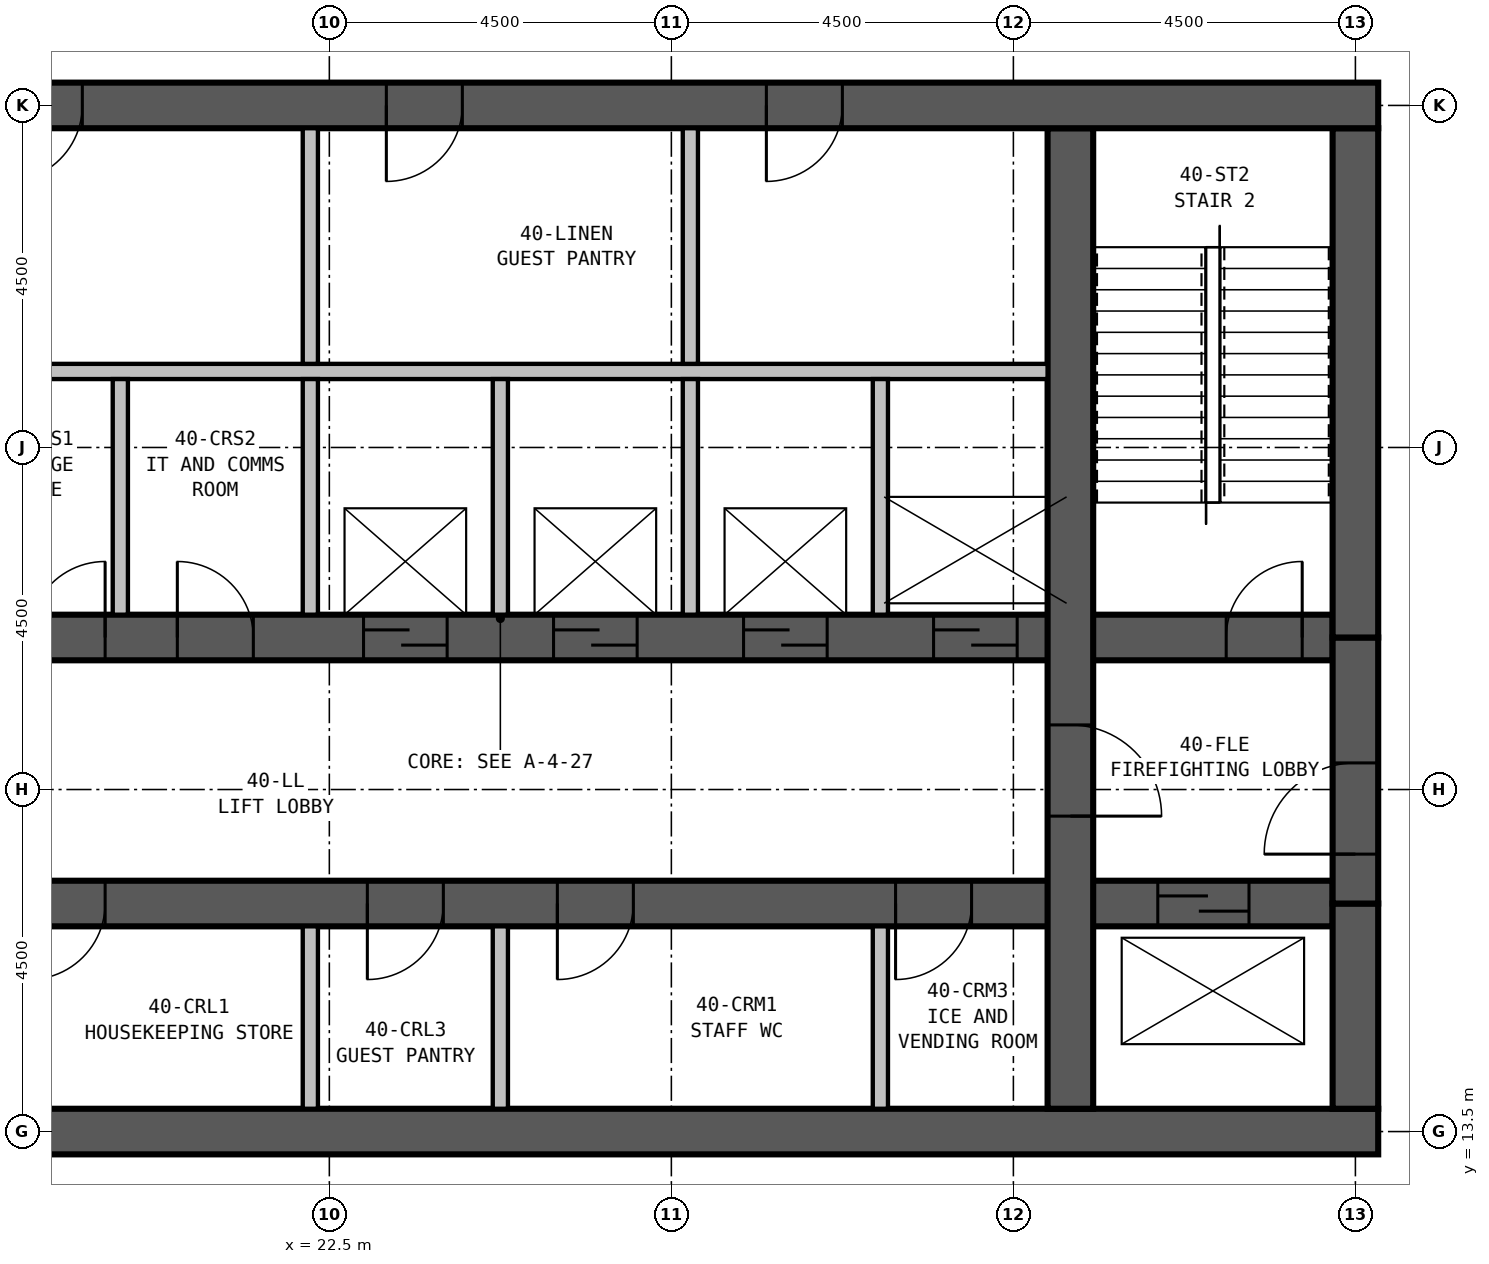
"""IFC4 building model, lengths in metres.
Left out: names, types, materials, properties, quantities, classifications, styles, units other than length and angle.
Written with IfcOpenShell. Run it as: python <this file> out.ifc"""

import sys

from ifc_helpers import new_model, si_unit, direction, frame, frame_2d, origin, place, context, subcontext, project, spatial, rectangle, extrude, element, fill, save


model = new_model("IFC4")
c1 = context("Model", 3, precision=1e-05, world=origin(), true_north=direction((0.0, 1.0)))
c2 = subcontext(c1, "Body", "Model", "MODEL_VIEW")
j1 = project(units=[si_unit("LENGTHUNIT", "METRE"), si_unit("PLANEANGLEUNIT", "RADIAN")], contexts=[c1])
p1 = place(None, origin())
s1 = spatial("IfcSite", under=j1, at=p1, CompositionType="ELEMENT")
p2 = place(p1, origin())
s2 = spatial("IfcBuilding", under=s1, at=p2, CompositionType="ELEMENT")
p3 = place(p2, frame((0.0, 0.0, 157.9)))
s3 = spatial("IfcBuildingStorey", under=s2, at=p3, CompositionType="ELEMENT", Elevation=157.9)
p4 = place(p3, frame((13.2, 13.5, 0.0), z_axis=(0.0, 0.0, 1.0), x_axis=(1.0, 0.0, 0.0)))
e1 = element("IfcWall", 1, at=p4, inside=s3, PredefinedType="SHEAR", context=c2, shape_type="SweptSolid", body=[
    extrude(rectangle(XDim=23.1, YDim=0.6, at=frame_2d((11.55, 0.0))), origin(), (0.0, 0.0, 1.0), 4.5),
])
p5 = place(p3, frame((36.3, 27.0, 0.0), z_axis=(0.0, 0.0, 1.0), x_axis=(-1.0, 0.0, 0.0)))
e2 = element("IfcWall", 2, at=p5, inside=s3, PredefinedType="SHEAR", context=c2, shape_type="SweptSolid", body=[
    extrude(rectangle(XDim=23.1, YDim=0.6, at=frame_2d((11.55, 0.0))), origin(), (0.0, 0.0, 1.0), 4.5),
])
p6 = place(p5, frame((17.05, 0.0, 0.0)))
e3 = element("IfcOpeningElement", 3, at=p6, cuts=e2, PredefinedType="OPENING", context=c2, shape_type="SweptSolid", body=[
    extrude(rectangle(XDim=1.0, YDim=2.1, at=frame_2d((0.5, 1.05))), frame((0.0, 0.31, 0.0), z_axis=(0.0, -1.0, 0.0), x_axis=(1.0, 0.0, 0.0)), (0.0, 0.0, 1.0), 0.62),
])
p7 = place(p5, frame((12.05, 0.0, 0.0)))
e4 = element("IfcOpeningElement", 4, at=p7, cuts=e2, PredefinedType="OPENING", context=c2, shape_type="SweptSolid", body=[
    extrude(rectangle(XDim=1.0, YDim=2.1, at=frame_2d((0.5, 1.05))), frame((0.0, 0.31, 0.0), z_axis=(0.0, -1.0, 0.0), x_axis=(1.0, 0.0, 0.0)), (0.0, 0.0, 1.0), 0.62),
])
p8 = place(p5, frame((7.05, 0.0, 0.0)))
e5 = element("IfcOpeningElement", 5, at=p8, cuts=e2, PredefinedType="OPENING", context=c2, shape_type="SweptSolid", body=[
    extrude(rectangle(XDim=1.0, YDim=2.1, at=frame_2d((0.5, 1.05))), frame((0.0, 0.31, 0.0), z_axis=(0.0, -1.0, 0.0), x_axis=(1.0, 0.0, 0.0)), (0.0, 0.0, 1.0), 0.62),
])
p9 = place(p3, frame((32.25, 13.8, 0.0), z_axis=(0.0, 0.0, 1.0), x_axis=(0.0, 1.0, 0.0)))
e6 = element("IfcWall", 6, at=p9, inside=s3, PredefinedType="SHEAR", context=c2, shape_type="SweptSolid", body=[
    extrude(rectangle(XDim=12.9, YDim=0.6, at=frame_2d((6.45, 0.0))), origin(), (0.0, 0.0, 1.0), 4.5),
])
p10 = place(p9, frame((5.05, 0.0, 0.0), z_axis=(0.0, 0.0, 1.0), x_axis=(-1.0, 0.0, 0.0)))
e7 = element("IfcOpeningElement", 7, at=p10, cuts=e6, PredefinedType="OPENING", context=c2, shape_type="SweptSolid", body=[
    extrude(rectangle(XDim=1.2, YDim=2.1, at=frame_2d((0.6, 1.05))), frame((0.0, 0.31, 0.0), z_axis=(0.0, -1.0, 0.0), x_axis=(1.0, 0.0, 0.0)), (0.0, 0.0, 1.0), 0.62),
])
p11 = place(p3, frame((13.8, 16.5, 0.0), z_axis=(0.0, 0.0, 1.0), x_axis=(1.0, 0.0, 0.0)))
e8 = element("IfcWall", 8, at=p11, inside=s3, PredefinedType="SHEAR", context=c2, shape_type="SweptSolid", body=[
    extrude(rectangle(XDim=21.9, YDim=0.6, at=frame_2d((10.95, 0.0))), origin(), (0.0, 0.0, 1.0), 4.5),
])
p12 = place(p11, frame((5.75, 0.0, 0.0), z_axis=(0.0, 0.0, 1.0), x_axis=(-1.0, 0.0, 0.0)))
e9 = element("IfcOpeningElement", 9, at=p12, cuts=e8, PredefinedType="OPENING", context=c2, shape_type="SweptSolid", body=[
    extrude(rectangle(XDim=1.0, YDim=2.1, at=frame_2d((0.5, 1.05))), frame((0.0, 0.31, 0.0), z_axis=(0.0, -1.0, 0.0), x_axis=(1.0, 0.0, 0.0)), (0.0, 0.0, 1.0), 0.62),
])
p13 = place(p11, frame((10.2, 0.0, 0.0), z_axis=(0.0, 0.0, 1.0), x_axis=(-1.0, 0.0, 0.0)))
e10 = element("IfcOpeningElement", 10, at=p13, cuts=e8, PredefinedType="OPENING", context=c2, shape_type="SweptSolid", body=[
    extrude(rectangle(XDim=1.0, YDim=2.1, at=frame_2d((0.5, 1.05))), frame((0.0, 0.31, 0.0), z_axis=(0.0, -1.0, 0.0), x_axis=(1.0, 0.0, 0.0)), (0.0, 0.0, 1.0), 0.62),
])
p14 = place(p11, frame((12.7, 0.0, 0.0), z_axis=(0.0, 0.0, 1.0), x_axis=(-1.0, 0.0, 0.0)))
e11 = element("IfcOpeningElement", 11, at=p14, cuts=e8, PredefinedType="OPENING", context=c2, shape_type="SweptSolid", body=[
    extrude(rectangle(XDim=1.0, YDim=2.1, at=frame_2d((0.5, 1.05))), frame((0.0, 0.31, 0.0), z_axis=(0.0, -1.0, 0.0), x_axis=(1.0, 0.0, 0.0)), (0.0, 0.0, 1.0), 0.62),
])
p15 = place(p11, frame((17.15, 0.0, 0.0), z_axis=(0.0, 0.0, 1.0), x_axis=(-1.0, 0.0, 0.0)))
e12 = element("IfcOpeningElement", 12, at=p15, cuts=e8, PredefinedType="OPENING", context=c2, shape_type="SweptSolid", body=[
    extrude(rectangle(XDim=1.0, YDim=2.1, at=frame_2d((0.5, 1.05))), frame((0.0, 0.31, 0.0), z_axis=(0.0, -1.0, 0.0), x_axis=(1.0, 0.0, 0.0)), (0.0, 0.0, 1.0), 0.62),
])
p16 = place(p11, frame((0.6, 0.0, 0.0)))
e13 = element("IfcOpeningElement", 13, at=p16, cuts=e8, PredefinedType="OPENING", context=c2, shape_type="SweptSolid", body=[
    extrude(rectangle(XDim=1.2, YDim=2.1, at=frame_2d((0.6, 1.05))), frame((0.0, 0.31, 0.0), z_axis=(0.0, -1.0, 0.0), x_axis=(1.0, 0.0, 0.0)), (0.0, 0.0, 1.0), 0.62),
])
p17 = place(p11, frame((19.6, 0.0, 0.0)))
e14 = element("IfcOpeningElement", 14, at=p17, cuts=e8, PredefinedType="OPENING", context=c2, shape_type="SweptSolid", body=[
    extrude(rectangle(XDim=1.2, YDim=2.1, at=frame_2d((0.6, 1.05))), frame((0.0, 0.31, 0.0), z_axis=(0.0, -1.0, 0.0), x_axis=(1.0, 0.0, 0.0)), (0.0, 0.0, 1.0), 0.62),
])
p18 = place(p3, frame((13.8, 20.0, 0.0), z_axis=(0.0, 0.0, 1.0), x_axis=(1.0, 0.0, 0.0)))
e15 = element("IfcWall", 15, at=p18, inside=s3, PredefinedType="SHEAR", context=c2, shape_type="SweptSolid", body=[
    extrude(rectangle(XDim=21.9, YDim=0.6, at=frame_2d((10.95, 0.0))), origin(), (0.0, 0.0, 1.0), 4.5),
])
p19 = place(p18, frame((0.5, 0.0, 0.0)))
e16 = element("IfcOpeningElement", 16, at=p19, cuts=e15, PredefinedType="OPENING", context=c2, shape_type="SweptSolid", body=[
    extrude(rectangle(XDim=1.0, YDim=2.1, at=frame_2d((0.5, 1.05))), frame((0.0, 0.31, 0.0), z_axis=(0.0, -1.0, 0.0), x_axis=(1.0, 0.0, 0.0)), (0.0, 0.0, 1.0), 0.62),
])
p20 = place(p18, frame((20.5, 0.0, 0.0)))
e17 = element("IfcOpeningElement", 17, at=p20, cuts=e15, PredefinedType="OPENING", context=c2, shape_type="SweptSolid", body=[
    extrude(rectangle(XDim=1.0, YDim=2.1, at=frame_2d((0.5, 1.05))), frame((0.0, 0.31, 0.0), z_axis=(0.0, -1.0, 0.0), x_axis=(1.0, 0.0, 0.0)), (0.0, 0.0, 1.0), 0.62),
])
p21 = place(p18, frame((9.15, 0.0, 0.0)))
e18 = element("IfcOpeningElement", 18, at=p21, cuts=e15, PredefinedType="OPENING", context=c2, shape_type="SweptSolid", body=[
    extrude(rectangle(XDim=1.1, YDim=2.1, at=frame_2d((0.55, 1.05))), frame((0.0, 0.31, 0.0), z_axis=(0.0, -1.0, 0.0), x_axis=(1.0, 0.0, 0.0)), (0.0, 0.0, 1.0), 0.62),
])
p22 = place(p18, frame((11.65, 0.0, 0.0)))
e19 = element("IfcOpeningElement", 19, at=p22, cuts=e15, PredefinedType="OPENING", context=c2, shape_type="SweptSolid", body=[
    extrude(rectangle(XDim=1.1, YDim=2.1, at=frame_2d((0.55, 1.05))), frame((0.0, 0.31, 0.0), z_axis=(0.0, -1.0, 0.0), x_axis=(1.0, 0.0, 0.0)), (0.0, 0.0, 1.0), 0.62),
])
p23 = place(p18, frame((14.15, 0.0, 0.0)))
e20 = element("IfcOpeningElement", 20, at=p23, cuts=e15, PredefinedType="OPENING", context=c2, shape_type="SweptSolid", body=[
    extrude(rectangle(XDim=1.1, YDim=2.1, at=frame_2d((0.55, 1.05))), frame((0.0, 0.31, 0.0), z_axis=(0.0, -1.0, 0.0), x_axis=(1.0, 0.0, 0.0)), (0.0, 0.0, 1.0), 0.62),
])
p24 = place(p18, frame((16.65, 0.0, 0.0)))
e21 = element("IfcOpeningElement", 21, at=p24, cuts=e15, PredefinedType="OPENING", context=c2, shape_type="SweptSolid", body=[
    extrude(rectangle(XDim=1.1, YDim=2.1, at=frame_2d((0.55, 1.05))), frame((0.0, 0.31, 0.0), z_axis=(0.0, -1.0, 0.0), x_axis=(1.0, 0.0, 0.0)), (0.0, 0.0, 1.0), 0.62),
])
p25 = place(p18, frame((4.75, 0.0, 0.0)))
e22 = element("IfcOpeningElement", 22, at=p25, cuts=e15, PredefinedType="OPENING", context=c2, shape_type="SweptSolid", body=[
    extrude(rectangle(XDim=1.0, YDim=2.1, at=frame_2d((0.5, 1.05))), frame((0.0, 0.31, 0.0), z_axis=(0.0, -1.0, 0.0), x_axis=(1.0, 0.0, 0.0)), (0.0, 0.0, 1.0), 0.62),
])
p26 = place(p18, frame((6.7, 0.0, 0.0)))
e23 = element("IfcOpeningElement", 23, at=p26, cuts=e15, PredefinedType="OPENING", context=c2, shape_type="SweptSolid", body=[
    extrude(rectangle(XDim=1.0, YDim=2.1, at=frame_2d((0.5, 1.05))), frame((0.0, 0.31, 0.0), z_axis=(0.0, -1.0, 0.0), x_axis=(1.0, 0.0, 0.0)), (0.0, 0.0, 1.0), 0.62),
])
p27 = place(p3, frame((36.0, 13.8, 0.0), z_axis=(0.0, 0.0, 1.0), x_axis=(0.0, 1.0, 0.0)))
e24 = element("IfcWall", 24, at=p27, inside=s3, PredefinedType="SHEAR", context=c2, shape_type="SweptSolid", body=[
    extrude(rectangle(XDim=2.7, YDim=0.6, at=frame_2d((1.35, 0.0))), origin(), (0.0, 0.0, 1.0), 4.5),
])
p28 = place(p3, frame((36.0, 16.5, 0.0), z_axis=(0.0, 0.0, 1.0), x_axis=(0.0, 1.0, 0.0)))
e25 = element("IfcWall", 25, at=p28, inside=s3, PredefinedType="SHEAR", context=c2, shape_type="SweptSolid", body=[
    extrude(rectangle(XDim=3.5, YDim=0.6, at=frame_2d((1.75, 0.0))), origin(), (0.0, 0.0, 1.0), 4.5),
])
p29 = place(p28, frame((0.65, 0.0, 0.0)))
e26 = element("IfcOpeningElement", 26, at=p29, cuts=e25, PredefinedType="OPENING", context=c2, shape_type="SweptSolid", body=[
    extrude(rectangle(XDim=1.2, YDim=2.1, at=frame_2d((0.6, 1.05))), frame((0.0, 0.31, 0.0), z_axis=(0.0, -1.0, 0.0), x_axis=(1.0, 0.0, 0.0)), (0.0, 0.0, 1.0), 0.62),
])
p30 = place(p3, frame((36.0, 20.0, 0.0), z_axis=(0.0, 0.0, 1.0), x_axis=(0.0, 1.0, 0.0)))
e27 = element("IfcWall", 27, at=p30, inside=s3, PredefinedType="SHEAR", context=c2, shape_type="SweptSolid", body=[
    extrude(rectangle(XDim=6.7, YDim=0.6, at=frame_2d((3.35, 0.0))), origin(), (0.0, 0.0, 1.0), 4.5),
])
p31 = place(p3, frame((19.75, 20.3, 0.0), z_axis=(0.0, 0.0, 1.0), x_axis=(0.0, 1.0, 0.0)))
e28 = element("IfcWall", 28, at=p31, inside=s3, PredefinedType="PARTITIONING", context=c2, shape_type="SweptSolid", body=[
    extrude(rectangle(XDim=3.1, YDim=0.2, at=frame_2d((1.55, 0.0))), origin(), (0.0, 0.0, 1.0), 4.25),
])
p32 = place(p3, frame((22.25, 13.8, 0.0), z_axis=(0.0, 0.0, 1.0), x_axis=(0.0, 1.0, 0.0)))
e29 = element("IfcWall", 29, at=p32, inside=s3, PredefinedType="PARTITIONING", context=c2, shape_type="SweptSolid", body=[
    extrude(rectangle(XDim=2.4, YDim=0.2, at=frame_2d((1.2, 0.0))), origin(), (0.0, 0.0, 1.0), 4.25),
])
p33 = place(p3, frame((22.25, 20.3, 0.0), z_axis=(0.0, 0.0, 1.0), x_axis=(0.0, 1.0, 0.0)))
e30 = element("IfcWall", 30, at=p33, inside=s3, PredefinedType="PARTITIONING", context=c2, shape_type="SweptSolid", body=[
    extrude(rectangle(XDim=3.1, YDim=0.2, at=frame_2d((1.55, 0.0))), origin(), (0.0, 0.0, 1.0), 4.25),
])
p34 = place(p3, frame((24.75, 13.8, 0.0), z_axis=(0.0, 0.0, 1.0), x_axis=(0.0, 1.0, 0.0)))
e31 = element("IfcWall", 31, at=p34, inside=s3, PredefinedType="PARTITIONING", context=c2, shape_type="SweptSolid", body=[
    extrude(rectangle(XDim=2.4, YDim=0.2, at=frame_2d((1.2, 0.0))), origin(), (0.0, 0.0, 1.0), 4.25),
])
for number, where, z_axis, x_axis in (
    (32, (24.75, 20.3, 0.0), (0.0, 0.0, 1.0), (0.0, 1.0, 0.0)),
    (33, (27.25, 20.3, 0.0), (0.0, 0.0, 1.0), (0.0, 1.0, 0.0)),
):
    element("IfcWall", number, at=place(p3, frame(where, z_axis=z_axis, x_axis=x_axis)), inside=s3, PredefinedType="PARTITIONING", context=c2, shape_type="SweptSolid", body=[
        extrude(rectangle(XDim=3.1, YDim=0.2, at=frame_2d((1.55, 0.0))), origin(), (0.0, 0.0, 1.0), 4.25),
    ])
p35 = place(p3, frame((29.75, 13.8, 0.0), z_axis=(0.0, 0.0, 1.0), x_axis=(0.0, 1.0, 0.0)))
e34 = element("IfcWall", 34, at=p35, inside=s3, PredefinedType="PARTITIONING", context=c2, shape_type="SweptSolid", body=[
    extrude(rectangle(XDim=2.4, YDim=0.2, at=frame_2d((1.2, 0.0))), origin(), (0.0, 0.0, 1.0), 4.25),
])
p36 = place(p3, frame((29.75, 20.3, 0.0), z_axis=(0.0, 0.0, 1.0), x_axis=(0.0, 1.0, 0.0)))
e35 = element("IfcWall", 35, at=p36, inside=s3, PredefinedType="PARTITIONING", context=c2, shape_type="SweptSolid", body=[
    extrude(rectangle(XDim=3.1, YDim=0.2, at=frame_2d((1.55, 0.0))), origin(), (0.0, 0.0, 1.0), 4.25),
])
p37 = place(p3, frame((17.55, 23.5, 0.0), z_axis=(0.0, 0.0, 1.0), x_axis=(1.0, 0.0, 0.0)))
e36 = element("IfcWall", 36, at=p37, inside=s3, PredefinedType="PARTITIONING", context=c2, shape_type="SweptSolid", body=[
    extrude(rectangle(XDim=14.4, YDim=0.2, at=frame_2d((7.2, 0.0))), origin(), (0.0, 0.0, 1.0), 4.25),
])
for number, where, z_axis, x_axis in (
    (37, (22.25, 23.6, 0.0), (0.0, 0.0, 1.0), (0.0, 1.0, 0.0)),
    (38, (27.25, 23.6, 0.0), (0.0, 0.0, 1.0), (0.0, 1.0, 0.0)),
):
    element("IfcWall", number, at=place(p3, frame(where, z_axis=z_axis, x_axis=x_axis)), inside=s3, PredefinedType="PARTITIONING", context=c2, shape_type="SweptSolid", body=[
        extrude(rectangle(XDim=3.1, YDim=0.2, at=frame_2d((1.55, 0.0))), origin(), (0.0, 0.0, 1.0), 4.25),
    ])
p38 = place(p29, origin())
e39 = element("IfcDoor", 39, at=p38, inside=s3, OperationType="SINGLE_SWING_LEFT", PredefinedType="DOOR", context=c2, shape_type="SweptSolid", body=[
    extrude(rectangle(XDim=1.2, YDim=2.1, at=frame_2d((0.6, 1.05))), frame((0.0, 0.3, 0.0), z_axis=(0.0, -1.0, 0.0), x_axis=(1.0, 0.0, 0.0)), (0.0, 0.0, 1.0), 0.6),
])
fill(e26, e39)
p39 = place(p10, origin())
e40 = element("IfcDoor", 40, at=p39, inside=s3, OperationType="SINGLE_SWING_RIGHT", PredefinedType="DOOR", context=c2, shape_type="SweptSolid", body=[
    extrude(rectangle(XDim=1.2, YDim=2.1, at=frame_2d((0.6, 1.05))), frame((0.0, 0.3, 0.0), z_axis=(0.0, -1.0, 0.0), x_axis=(1.0, 0.0, 0.0)), (0.0, 0.0, 1.0), 0.6),
])
fill(e7, e40)
p40 = place(p20, origin())
e41 = element("IfcDoor", 41, at=p40, inside=s3, OperationType="SINGLE_SWING_RIGHT", PredefinedType="DOOR", context=c2, shape_type="SweptSolid", body=[
    extrude(rectangle(XDim=1.0, YDim=2.1, at=frame_2d((0.5, 1.05))), frame((0.0, 0.3, 0.0), z_axis=(0.0, -1.0, 0.0), x_axis=(1.0, 0.0, 0.0)), (0.0, 0.0, 1.0), 0.6),
])
fill(e17, e41)
p41 = place(p21, origin())
e42 = element("IfcDoor", 42, at=p41, inside=s3, OperationType="SLIDING_TO_LEFT", PredefinedType="DOOR", context=c2, shape_type="SweptSolid", body=[
    extrude(rectangle(XDim=1.1, YDim=2.1, at=frame_2d((0.55, 1.05))), frame((0.0, 0.3, 0.0), z_axis=(0.0, -1.0, 0.0), x_axis=(1.0, 0.0, 0.0)), (0.0, 0.0, 1.0), 0.6),
])
fill(e18, e42)
p42 = place(p22, origin())
e43 = element("IfcDoor", 43, at=p42, inside=s3, OperationType="SLIDING_TO_LEFT", PredefinedType="DOOR", context=c2, shape_type="SweptSolid", body=[
    extrude(rectangle(XDim=1.1, YDim=2.1, at=frame_2d((0.55, 1.05))), frame((0.0, 0.3, 0.0), z_axis=(0.0, -1.0, 0.0), x_axis=(1.0, 0.0, 0.0)), (0.0, 0.0, 1.0), 0.6),
])
fill(e19, e43)
p43 = place(p23, origin())
e44 = element("IfcDoor", 44, at=p43, inside=s3, OperationType="SLIDING_TO_LEFT", PredefinedType="DOOR", context=c2, shape_type="SweptSolid", body=[
    extrude(rectangle(XDim=1.1, YDim=2.1, at=frame_2d((0.55, 1.05))), frame((0.0, 0.3, 0.0), z_axis=(0.0, -1.0, 0.0), x_axis=(1.0, 0.0, 0.0)), (0.0, 0.0, 1.0), 0.6),
])
fill(e20, e44)
p44 = place(p24, origin())
e45 = element("IfcDoor", 45, at=p44, inside=s3, OperationType="SLIDING_TO_LEFT", PredefinedType="DOOR", context=c2, shape_type="SweptSolid", body=[
    extrude(rectangle(XDim=1.1, YDim=2.1, at=frame_2d((0.55, 1.05))), frame((0.0, 0.3, 0.0), z_axis=(0.0, -1.0, 0.0), x_axis=(1.0, 0.0, 0.0)), (0.0, 0.0, 1.0), 0.6),
])
fill(e21, e45)
p45 = place(p12, origin())
e46 = element("IfcDoor", 46, at=p45, inside=s3, OperationType="SINGLE_SWING_RIGHT", PredefinedType="DOOR", context=c2, shape_type="SweptSolid", body=[
    extrude(rectangle(XDim=1.0, YDim=2.1, at=frame_2d((0.5, 1.05))), frame((0.0, 0.3, 0.0), z_axis=(0.0, -1.0, 0.0), x_axis=(1.0, 0.0, 0.0)), (0.0, 0.0, 1.0), 0.6),
])
fill(e9, e46)
p46 = place(p13, origin())
e47 = element("IfcDoor", 47, at=p46, inside=s3, OperationType="SINGLE_SWING_RIGHT", PredefinedType="DOOR", context=c2, shape_type="SweptSolid", body=[
    extrude(rectangle(XDim=1.0, YDim=2.1, at=frame_2d((0.5, 1.05))), frame((0.0, 0.3, 0.0), z_axis=(0.0, -1.0, 0.0), x_axis=(1.0, 0.0, 0.0)), (0.0, 0.0, 1.0), 0.6),
])
fill(e10, e47)
p47 = place(p14, origin())
e48 = element("IfcDoor", 48, at=p47, inside=s3, OperationType="SINGLE_SWING_RIGHT", PredefinedType="DOOR", context=c2, shape_type="SweptSolid", body=[
    extrude(rectangle(XDim=1.0, YDim=2.1, at=frame_2d((0.5, 1.05))), frame((0.0, 0.3, 0.0), z_axis=(0.0, -1.0, 0.0), x_axis=(1.0, 0.0, 0.0)), (0.0, 0.0, 1.0), 0.6),
])
fill(e11, e48)
p48 = place(p15, origin())
e49 = element("IfcDoor", 49, at=p48, inside=s3, OperationType="SINGLE_SWING_RIGHT", PredefinedType="DOOR", context=c2, shape_type="SweptSolid", body=[
    extrude(rectangle(XDim=1.0, YDim=2.1, at=frame_2d((0.5, 1.05))), frame((0.0, 0.3, 0.0), z_axis=(0.0, -1.0, 0.0), x_axis=(1.0, 0.0, 0.0)), (0.0, 0.0, 1.0), 0.6),
])
fill(e12, e49)
p49 = place(p25, origin())
e50 = element("IfcDoor", 50, at=p49, inside=s3, OperationType="SINGLE_SWING_RIGHT", PredefinedType="DOOR", context=c2, shape_type="SweptSolid", body=[
    extrude(rectangle(XDim=1.0, YDim=2.1, at=frame_2d((0.5, 1.05))), frame((0.0, 0.3, 0.0), z_axis=(0.0, -1.0, 0.0), x_axis=(1.0, 0.0, 0.0)), (0.0, 0.0, 1.0), 0.6),
])
fill(e22, e50)
p50 = place(p26, origin())
e51 = element("IfcDoor", 51, at=p50, inside=s3, OperationType="SINGLE_SWING_LEFT", PredefinedType="DOOR", context=c2, shape_type="SweptSolid", body=[
    extrude(rectangle(XDim=1.0, YDim=2.1, at=frame_2d((0.5, 1.05))), frame((0.0, 0.3, 0.0), z_axis=(0.0, -1.0, 0.0), x_axis=(1.0, 0.0, 0.0)), (0.0, 0.0, 1.0), 0.6),
])
fill(e23, e51)
p51 = place(p17, origin())
e52 = element("IfcDoor", 52, at=p51, inside=s3, OperationType="SLIDING_TO_LEFT", PredefinedType="DOOR", context=c2, shape_type="SweptSolid", body=[
    extrude(rectangle(XDim=1.2, YDim=2.1, at=frame_2d((0.6, 1.05))), frame((0.0, 0.3, 0.0), z_axis=(0.0, -1.0, 0.0), x_axis=(1.0, 0.0, 0.0)), (0.0, 0.0, 1.0), 0.6),
])
fill(e14, e52)
p52 = place(p6, origin())
e53 = element("IfcDoor", 53, at=p52, inside=s3, OperationType="SINGLE_SWING_RIGHT", PredefinedType="DOOR", context=c2, shape_type="SweptSolid", body=[
    extrude(rectangle(XDim=1.0, YDim=2.1, at=frame_2d((0.5, 1.05))), frame((0.0, 0.3, 0.0), z_axis=(0.0, -1.0, 0.0), x_axis=(1.0, 0.0, 0.0)), (0.0, 0.0, 1.0), 0.6),
])
fill(e3, e53)
p53 = place(p7, origin())
e54 = element("IfcDoor", 54, at=p53, inside=s3, OperationType="SINGLE_SWING_RIGHT", PredefinedType="DOOR", context=c2, shape_type="SweptSolid", body=[
    extrude(rectangle(XDim=1.0, YDim=2.1, at=frame_2d((0.5, 1.05))), frame((0.0, 0.3, 0.0), z_axis=(0.0, -1.0, 0.0), x_axis=(1.0, 0.0, 0.0)), (0.0, 0.0, 1.0), 0.6),
])
fill(e4, e54)
p54 = place(p8, origin())
e55 = element("IfcDoor", 55, at=p54, inside=s3, OperationType="SINGLE_SWING_RIGHT", PredefinedType="DOOR", context=c2, shape_type="SweptSolid", body=[
    extrude(rectangle(XDim=1.0, YDim=2.1, at=frame_2d((0.5, 1.05))), frame((0.0, 0.3, 0.0), z_axis=(0.0, -1.0, 0.0), x_axis=(1.0, 0.0, 0.0)), (0.0, 0.0, 1.0), 0.6),
])
fill(e5, e55)
save(model, sys.argv[1])
